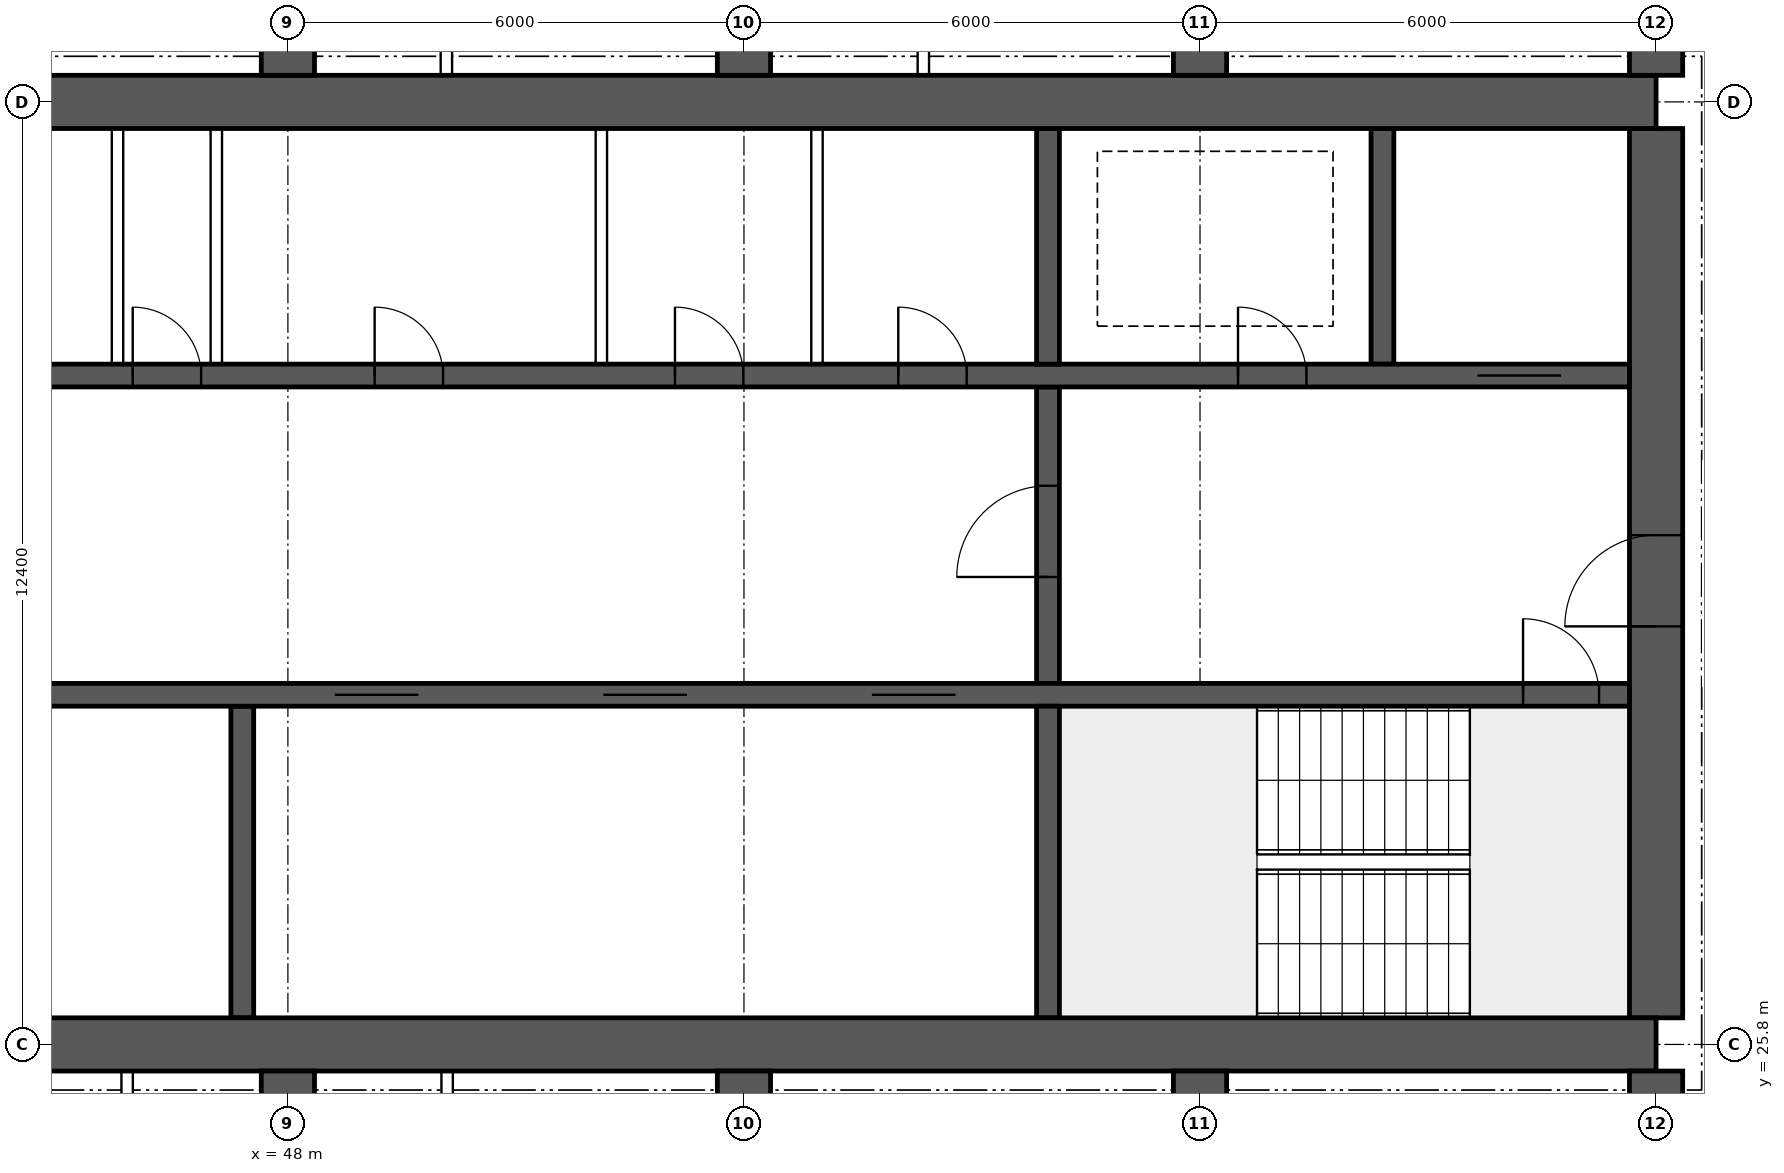
"""IFC4 building model, lengths in metres.
Left out: names, types, materials, properties, quantities, classifications, styles, units other than length and angle.
Written with IfcOpenShell. Run it as: python <this file> out.ifc"""

import sys

from ifc_helpers import new_model, si_unit, direction, frame, frame_2d, origin, place, context, subcontext, project, spatial, rectangle, extrude, element, fill, save


model = new_model("IFC4")
c1 = context("Model", 3, precision=1e-05, world=origin(), true_north=direction((0.0, 1.0)))
c2 = subcontext(c1, "Body", "Model", "MODEL_VIEW")
j1 = project(units=[si_unit("LENGTHUNIT", "METRE"), si_unit("PLANEANGLEUNIT", "RADIAN")], contexts=[c1])
p1 = place(None, origin())
s1 = spatial("IfcSite", under=j1, at=p1, CompositionType="ELEMENT")
p2 = place(p1, origin())
s2 = spatial("IfcBuilding", under=s1, at=p2, CompositionType="ELEMENT")
p3 = place(p2, frame((0.0, 0.0, 239.05)))
s3 = spatial("IfcBuildingStorey", under=s2, at=p3, CompositionType="ELEMENT", Elevation=239.05)
for number, where, z_axis, x_axis in (
    (1, (18.0, 25.8, 0.0), (0.0, 0.0, 1.0), (1.0, 0.0, 0.0)),
    (2, (18.0, 38.2, 0.0), (0.0, 0.0, 1.0), (1.0, 0.0, 0.0)),
):
    element("IfcWall", number, at=place(p3, frame(where, z_axis=z_axis, x_axis=x_axis)), inside=s3, PredefinedType="SHEAR", context=c2, shape_type="SweptSolid", body=[
        extrude(rectangle(XDim=48.0, YDim=0.7, at=frame_2d((24.0, 0.0))), origin(), (0.0, 0.0, 1.0), 3.75),
    ])
p4 = place(p3, frame((66.0, 26.15, 0.0), z_axis=(0.0, 0.0, 1.0), x_axis=(0.0, 1.0, 0.0)))
e3 = element("IfcWall", 3, at=p4, inside=s3, PredefinedType="SHEAR", context=c2, shape_type="SweptSolid", body=[
    extrude(rectangle(XDim=11.7, YDim=0.7, at=frame_2d((5.85, 0.0))), origin(), (0.0, 0.0, 1.0), 3.75),
])
p5 = place(p4, frame((5.15, 0.0, 0.0)))
e4 = element("IfcOpeningElement", 4, at=p5, cuts=e3, PredefinedType="OPENING", context=c2, shape_type="SweptSolid", body=[
    extrude(rectangle(XDim=1.2, YDim=2.1, at=frame_2d((0.6, 1.05))), frame((0.0, 0.36, 0.0), z_axis=(0.0, -1.0, 0.0), x_axis=(1.0, 0.0, 0.0)), (0.0, 0.0, 1.0), 0.72),
])
p6 = place(p3, frame((18.35, 30.4, 0.0), z_axis=(0.0, 0.0, 1.0), x_axis=(1.0, 0.0, 0.0)))
e5 = element("IfcWall", 5, at=p6, inside=s3, PredefinedType="SHEAR", context=c2, shape_type="SweptSolid", body=[
    extrude(rectangle(XDim=47.3, YDim=0.3, at=frame_2d((23.65, 0.0))), origin(), (0.0, 0.0, 1.0), 3.75),
])
p7 = place(p6, frame((0.4, 0.0, 0.0)))
e6 = element("IfcOpeningElement", 6, at=p7, cuts=e5, PredefinedType="OPENING", context=c2, shape_type="SweptSolid", body=[
    extrude(rectangle(XDim=1.0, YDim=2.1, at=frame_2d((0.5, 1.05))), frame((0.0, 0.16, 0.0), z_axis=(0.0, -1.0, 0.0), x_axis=(1.0, 0.0, 0.0)), (0.0, 0.0, 1.0), 0.32),
])
p8 = place(p6, frame((45.9, 0.0, 0.0)))
e7 = element("IfcOpeningElement", 7, at=p8, cuts=e5, PredefinedType="OPENING", context=c2, shape_type="SweptSolid", body=[
    extrude(rectangle(XDim=1.0, YDim=2.1, at=frame_2d((0.5, 1.05))), frame((0.0, 0.16, 0.0), z_axis=(0.0, -1.0, 0.0), x_axis=(1.0, 0.0, 0.0)), (0.0, 0.0, 1.0), 0.32),
])
p9 = place(p6, frame((8.4, 0.0, 0.0)))
e8 = element("IfcOpeningElement", 8, at=p9, cuts=e5, PredefinedType="OPENING", context=c2, shape_type="SweptSolid", body=[
    extrude(rectangle(XDim=1.1, YDim=2.1, at=frame_2d((0.55, 1.05))), frame((0.0, 0.16, 0.0), z_axis=(0.0, -1.0, 0.0), x_axis=(1.0, 0.0, 0.0)), (0.0, 0.0, 1.0), 0.32),
])
p10 = place(p6, frame((11.0, 0.0, 0.0)))
e9 = element("IfcOpeningElement", 9, at=p10, cuts=e5, PredefinedType="OPENING", context=c2, shape_type="SweptSolid", body=[
    extrude(rectangle(XDim=1.1, YDim=2.1, at=frame_2d((0.55, 1.05))), frame((0.0, 0.16, 0.0), z_axis=(0.0, -1.0, 0.0), x_axis=(1.0, 0.0, 0.0)), (0.0, 0.0, 1.0), 0.32),
])
p11 = place(p6, frame((13.6, 0.0, 0.0)))
e10 = element("IfcOpeningElement", 10, at=p11, cuts=e5, PredefinedType="OPENING", context=c2, shape_type="SweptSolid", body=[
    extrude(rectangle(XDim=1.1, YDim=2.1, at=frame_2d((0.55, 1.05))), frame((0.0, 0.16, 0.0), z_axis=(0.0, -1.0, 0.0), x_axis=(1.0, 0.0, 0.0)), (0.0, 0.0, 1.0), 0.32),
])
p12 = place(p6, frame((16.2, 0.0, 0.0)))
e11 = element("IfcOpeningElement", 11, at=p12, cuts=e5, PredefinedType="OPENING", context=c2, shape_type="SweptSolid", body=[
    extrude(rectangle(XDim=1.1, YDim=2.1, at=frame_2d((0.55, 1.05))), frame((0.0, 0.16, 0.0), z_axis=(0.0, -1.0, 0.0), x_axis=(1.0, 0.0, 0.0)), (0.0, 0.0, 1.0), 0.32),
])
p13 = place(p6, frame((18.975, 0.0, 0.0)))
e12 = element("IfcOpeningElement", 12, at=p13, cuts=e5, PredefinedType="OPENING", context=c2, shape_type="SweptSolid", body=[
    extrude(rectangle(XDim=0.9, YDim=2.1, at=frame_2d((0.45, 1.05))), frame((0.0, 0.16, 0.0), z_axis=(0.0, -1.0, 0.0), x_axis=(1.0, 0.0, 0.0)), (0.0, 0.0, 1.0), 0.32),
])
p14 = place(p6, frame((24.475, 0.0, 0.0)))
e13 = element("IfcOpeningElement", 13, at=p14, cuts=e5, PredefinedType="OPENING", context=c2, shape_type="SweptSolid", body=[
    extrude(rectangle(XDim=0.9, YDim=2.1, at=frame_2d((0.45, 1.05))), frame((0.0, 0.16, 0.0), z_axis=(0.0, -1.0, 0.0), x_axis=(1.0, 0.0, 0.0)), (0.0, 0.0, 1.0), 0.32),
])
p15 = place(p6, frame((30.267, 0.0, 0.0)))
e14 = element("IfcOpeningElement", 14, at=p15, cuts=e5, PredefinedType="OPENING", context=c2, shape_type="SweptSolid", body=[
    extrude(rectangle(XDim=1.1, YDim=2.1, at=frame_2d((0.55, 1.05))), frame((0.0, 0.16, 0.0), z_axis=(0.0, -1.0, 0.0), x_axis=(1.0, 0.0, 0.0)), (0.0, 0.0, 1.0), 0.32),
])
p16 = place(p6, frame((33.8, 0.0, 0.0)))
e15 = element("IfcOpeningElement", 15, at=p16, cuts=e5, PredefinedType="OPENING", context=c2, shape_type="SweptSolid", body=[
    extrude(rectangle(XDim=1.1, YDim=2.1, at=frame_2d((0.55, 1.05))), frame((0.0, 0.16, 0.0), z_axis=(0.0, -1.0, 0.0), x_axis=(1.0, 0.0, 0.0)), (0.0, 0.0, 1.0), 0.32),
])
p17 = place(p6, frame((37.333, 0.0, 0.0)))
e16 = element("IfcOpeningElement", 16, at=p17, cuts=e5, PredefinedType="OPENING", context=c2, shape_type="SweptSolid", body=[
    extrude(rectangle(XDim=1.1, YDim=2.1, at=frame_2d((0.55, 1.05))), frame((0.0, 0.16, 0.0), z_axis=(0.0, -1.0, 0.0), x_axis=(1.0, 0.0, 0.0)), (0.0, 0.0, 1.0), 0.32),
])
p18 = place(p3, frame((18.35, 34.6, 0.0), z_axis=(0.0, 0.0, 1.0), x_axis=(1.0, 0.0, 0.0)))
e17 = element("IfcWall", 17, at=p18, inside=s3, PredefinedType="SHEAR", context=c2, shape_type="SweptSolid", body=[
    extrude(rectangle(XDim=47.3, YDim=0.3, at=frame_2d((23.65, 0.0))), origin(), (0.0, 0.0, 1.0), 3.75),
])
p19 = place(p18, frame((0.9, 0.0, 0.0)))
e18 = element("IfcOpeningElement", 18, at=p19, cuts=e17, PredefinedType="OPENING", context=c2, shape_type="SweptSolid", body=[
    extrude(rectangle(XDim=1.1, YDim=2.1, at=frame_2d((0.55, 1.05))), frame((0.0, 0.16, 0.0), z_axis=(0.0, -1.0, 0.0), x_axis=(1.0, 0.0, 0.0)), (0.0, 0.0, 1.0), 0.32),
])
p20 = place(p18, frame((45.3, 0.0, 0.0)))
e19 = element("IfcOpeningElement", 19, at=p20, cuts=e17, PredefinedType="OPENING", context=c2, shape_type="SweptSolid", body=[
    extrude(rectangle(XDim=1.1, YDim=2.1, at=frame_2d((0.55, 1.05))), frame((0.0, 0.16, 0.0), z_axis=(0.0, -1.0, 0.0), x_axis=(1.0, 0.0, 0.0)), (0.0, 0.0, 1.0), 0.32),
])
p21 = place(p18, frame((4.25, 0.0, 0.0)))
e20 = element("IfcOpeningElement", 20, at=p21, cuts=e17, PredefinedType="OPENING", context=c2, shape_type="SweptSolid", body=[
    extrude(rectangle(XDim=0.9, YDim=2.1, at=frame_2d((0.45, 1.05))), frame((0.0, 0.16, 0.0), z_axis=(0.0, -1.0, 0.0), x_axis=(1.0, 0.0, 0.0)), (0.0, 0.0, 1.0), 0.32),
])
p22 = place(p18, frame((42.15, 0.0, 0.0)))
e21 = element("IfcOpeningElement", 21, at=p22, cuts=e17, PredefinedType="OPENING", context=c2, shape_type="SweptSolid", body=[
    extrude(rectangle(XDim=0.9, YDim=2.1, at=frame_2d((0.45, 1.05))), frame((0.0, 0.16, 0.0), z_axis=(0.0, -1.0, 0.0), x_axis=(1.0, 0.0, 0.0)), (0.0, 0.0, 1.0), 0.32),
])
p23 = place(p18, frame((9.025, 0.0, 0.0)))
e22 = element("IfcOpeningElement", 22, at=p23, cuts=e17, PredefinedType="OPENING", context=c2, shape_type="SweptSolid", body=[
    extrude(rectangle(XDim=0.9, YDim=2.1, at=frame_2d((0.45, 1.05))), frame((0.0, 0.16, 0.0), z_axis=(0.0, -1.0, 0.0), x_axis=(1.0, 0.0, 0.0)), (0.0, 0.0, 1.0), 0.32),
])
p24 = place(p18, frame((12.999, 0.0, 0.0)))
e23 = element("IfcOpeningElement", 23, at=p24, cuts=e17, PredefinedType="OPENING", context=c2, shape_type="SweptSolid", body=[
    extrude(rectangle(XDim=0.9, YDim=2.1, at=frame_2d((0.45, 1.05))), frame((0.0, 0.16, 0.0), z_axis=(0.0, -1.0, 0.0), x_axis=(1.0, 0.0, 0.0)), (0.0, 0.0, 1.0), 0.32),
])
p25 = place(p18, frame((16.646, 0.0, 0.0)))
e24 = element("IfcOpeningElement", 24, at=p25, cuts=e17, PredefinedType="OPENING", context=c2, shape_type="SweptSolid", body=[
    extrude(rectangle(XDim=0.9, YDim=2.1, at=frame_2d((0.45, 1.05))), frame((0.0, 0.16, 0.0), z_axis=(0.0, -1.0, 0.0), x_axis=(1.0, 0.0, 0.0)), (0.0, 0.0, 1.0), 0.32),
])
p26 = place(p18, frame((20.405, 0.0, 0.0)))
e25 = element("IfcOpeningElement", 25, at=p26, cuts=e17, PredefinedType="OPENING", context=c2, shape_type="SweptSolid", body=[
    extrude(rectangle(XDim=0.9, YDim=2.1, at=frame_2d((0.45, 1.05))), frame((0.0, 0.16, 0.0), z_axis=(0.0, -1.0, 0.0), x_axis=(1.0, 0.0, 0.0)), (0.0, 0.0, 1.0), 0.32),
])
p27 = place(p18, frame((24.811, 0.0, 0.0)))
e26 = element("IfcOpeningElement", 26, at=p27, cuts=e17, PredefinedType="OPENING", context=c2, shape_type="SweptSolid", body=[
    extrude(rectangle(XDim=0.9, YDim=2.1, at=frame_2d((0.45, 1.05))), frame((0.0, 0.16, 0.0), z_axis=(0.0, -1.0, 0.0), x_axis=(1.0, 0.0, 0.0)), (0.0, 0.0, 1.0), 0.32),
])
p28 = place(p18, frame((27.608, 0.0, 0.0)))
e27 = element("IfcOpeningElement", 27, at=p28, cuts=e17, PredefinedType="OPENING", context=c2, shape_type="SweptSolid", body=[
    extrude(rectangle(XDim=0.9, YDim=2.1, at=frame_2d((0.45, 1.05))), frame((0.0, 0.16, 0.0), z_axis=(0.0, -1.0, 0.0), x_axis=(1.0, 0.0, 0.0)), (0.0, 0.0, 1.0), 0.32),
])
p29 = place(p18, frame((30.791, 0.0, 0.0)))
e28 = element("IfcOpeningElement", 28, at=p29, cuts=e17, PredefinedType="OPENING", context=c2, shape_type="SweptSolid", body=[
    extrude(rectangle(XDim=0.9, YDim=2.1, at=frame_2d((0.45, 1.05))), frame((0.0, 0.16, 0.0), z_axis=(0.0, -1.0, 0.0), x_axis=(1.0, 0.0, 0.0)), (0.0, 0.0, 1.0), 0.32),
])
p30 = place(p18, frame((34.742, 0.0, 0.0)))
e29 = element("IfcOpeningElement", 29, at=p30, cuts=e17, PredefinedType="OPENING", context=c2, shape_type="SweptSolid", body=[
    extrude(rectangle(XDim=0.9, YDim=2.1, at=frame_2d((0.45, 1.05))), frame((0.0, 0.16, 0.0), z_axis=(0.0, -1.0, 0.0), x_axis=(1.0, 0.0, 0.0)), (0.0, 0.0, 1.0), 0.32),
])
p31 = place(p18, frame((37.68, 0.0, 0.0)))
e30 = element("IfcOpeningElement", 30, at=p31, cuts=e17, PredefinedType="OPENING", context=c2, shape_type="SweptSolid", body=[
    extrude(rectangle(XDim=0.9, YDim=2.1, at=frame_2d((0.45, 1.05))), frame((0.0, 0.16, 0.0), z_axis=(0.0, -1.0, 0.0), x_axis=(1.0, 0.0, 0.0)), (0.0, 0.0, 1.0), 0.32),
])
p32 = place(p3, frame((58.0, 26.15, 0.0), z_axis=(0.0, 0.0, 1.0), x_axis=(0.0, 1.0, 0.0)))
e31 = element("IfcWall", 31, at=p32, inside=s3, PredefinedType="SHEAR", context=c2, shape_type="SweptSolid", body=[
    extrude(rectangle(XDim=4.1, YDim=0.3, at=frame_2d((2.05, 0.0))), origin(), (0.0, 0.0, 1.0), 3.75),
])
p33 = place(p3, frame((58.0, 30.55, 0.0), z_axis=(0.0, 0.0, 1.0), x_axis=(0.0, 1.0, 0.0)))
e32 = element("IfcWall", 32, at=p33, inside=s3, PredefinedType="SHEAR", context=c2, shape_type="SweptSolid", body=[
    extrude(rectangle(XDim=3.9, YDim=0.3, at=frame_2d((1.95, 0.0))), origin(), (0.0, 0.0, 1.0), 3.75),
])
p34 = place(p33, frame((1.4, 0.0, 0.0)))
e33 = element("IfcOpeningElement", 33, at=p34, cuts=e32, PredefinedType="OPENING", context=c2, shape_type="SweptSolid", body=[
    extrude(rectangle(XDim=1.2, YDim=2.1, at=frame_2d((0.6, 1.05))), frame((0.0, 0.16, 0.0), z_axis=(0.0, -1.0, 0.0), x_axis=(1.0, 0.0, 0.0)), (0.0, 0.0, 1.0), 0.32),
])
for number, where, z_axis, x_axis in (
    (34, (62.4, 34.75, 0.0), (0.0, 0.0, 1.0), (0.0, 1.0, 0.0)),
    (35, (58.0, 34.75, 0.0), (0.0, 0.0, 1.0), (0.0, 1.0, 0.0)),
):
    element("IfcWall", number, at=place(p3, frame(where, z_axis=z_axis, x_axis=x_axis)), inside=s3, PredefinedType="SHEAR", context=c2, shape_type="SweptSolid", body=[
        extrude(rectangle(XDim=3.1, YDim=0.3, at=frame_2d((1.55, 0.0))), origin(), (0.0, 0.0, 1.0), 3.75),
    ])
p35 = place(p3, frame((47.4, 26.15, 0.0), z_axis=(0.0, 0.0, 1.0), x_axis=(0.0, 1.0, 0.0)))
e36 = element("IfcWall", 36, at=p35, inside=s3, PredefinedType="SHEAR", context=c2, shape_type="SweptSolid", body=[
    extrude(rectangle(XDim=4.1, YDim=0.3, at=frame_2d((2.05, 0.0))), origin(), (0.0, 0.0, 1.0), 3.75),
])
for number, where, z_axis, x_axis in (
    (37, (48.0, 18.4, 0.0), (0.0, 0.0, 1.0), (0.0, 1.0, 0.0)),
    (38, (48.0, 38.55, 0.0), (0.0, 0.0, 1.0), (0.0, 1.0, 0.0)),
    (39, (54.0, 18.4, 0.0), (0.0, 0.0, 1.0), (0.0, 1.0, 0.0)),
    (40, (54.0, 38.55, 0.0), (0.0, 0.0, 1.0), (0.0, 1.0, 0.0)),
    (41, (60.0, 18.4, 0.0), (0.0, 0.0, 1.0), (0.0, 1.0, 0.0)),
    (42, (60.0, 38.55, 0.0), (0.0, 0.0, 1.0), (0.0, 1.0, 0.0)),
    (43, (66.0, 18.4, 0.0), (0.0, 0.0, 1.0), (0.0, 1.0, 0.0)),
    (44, (66.0, 38.55, 0.0), (0.0, 0.0, 1.0), (0.0, 1.0, 0.0)),
):
    element("IfcWall", number, at=place(p3, frame(where, z_axis=z_axis, x_axis=x_axis)), inside=s3, PredefinedType="SHEAR", context=c2, shape_type="SweptSolid", body=[
        extrude(rectangle(XDim=7.05, YDim=0.7, at=frame_2d((3.525, 0.0))), origin(), (0.0, 0.0, 1.0), 3.75),
    ])
for number, where, z_axis, x_axis in (
    (45, (45.758, 34.75, 0.0), (0.0, 0.0, 1.0), (0.0, 1.0, 0.0)),
    (46, (47.058, 34.75, 0.0), (0.0, 0.0, 1.0), (0.0, 1.0, 0.0)),
    (47, (52.124, 34.75, 0.0), (0.0, 0.0, 1.0), (0.0, 1.0, 0.0)),
    (48, (54.961, 34.75, 0.0), (0.0, 0.0, 1.0), (0.0, 1.0, 0.0)),
):
    element("IfcWall", number, at=place(p3, frame(where, z_axis=z_axis, x_axis=x_axis)), inside=s3, PredefinedType="SOLIDWALL", context=c2, shape_type="SweptSolid", body=[
        extrude(rectangle(XDim=3.1, YDim=0.15, at=frame_2d((1.55, 0.0))), origin(), (0.0, 0.0, 1.0), 3.5),
    ])
for number, where, z_axis, x_axis in (
    (49, (45.885, 18.5, 0.0), (0.0, 0.0, 1.0), (0.0, 1.0, 0.0)),
    (50, (50.095, 18.5, 0.0), (0.0, 0.0, 1.0), (0.0, 1.0, 0.0)),
    (51, (50.085, 38.55, 0.0), (0.0, 0.0, 1.0), (0.0, 1.0, 0.0)),
    (52, (56.36, 38.55, 0.0), (0.0, 0.0, 1.0), (0.0, 1.0, 0.0)),
):
    element("IfcWall", number, at=place(p3, frame(where, z_axis=z_axis, x_axis=x_axis)), inside=s3, PredefinedType="PARTITIONING", context=c2, shape_type="SweptSolid", body=[
        extrude(rectangle(XDim=6.95, YDim=0.15, at=frame_2d((3.475, 0.0))), origin(), (0.0, 0.0, 1.0), 3.5),
    ])
p36 = place(p5, origin())
e53 = element("IfcDoor", 53, at=p36, inside=s3, OperationType="SINGLE_SWING_LEFT", PredefinedType="DOOR", context=c2, shape_type="SweptSolid", body=[
    extrude(rectangle(XDim=1.2, YDim=2.1, at=frame_2d((0.6, 1.05))), frame((0.0, 0.025, 0.0), z_axis=(0.0, -1.0, 0.0), x_axis=(1.0, 0.0, 0.0)), (0.0, 0.0, 1.0), 0.05),
])
fill(e4, e53)
p37 = place(p8, origin())
e54 = element("IfcDoor", 54, at=p37, inside=s3, OperationType="SINGLE_SWING_LEFT", PredefinedType="DOOR", context=c2, shape_type="SweptSolid", body=[
    extrude(rectangle(XDim=1.0, YDim=2.1, at=frame_2d((0.5, 1.05))), frame((0.0, 0.025, 0.0), z_axis=(0.0, -1.0, 0.0), x_axis=(1.0, 0.0, 0.0)), (0.0, 0.0, 1.0), 0.05),
])
fill(e7, e54)
p38 = place(p20, origin())
e55 = element("IfcDoor", 55, at=p38, inside=s3, OperationType="DOUBLE_DOOR_SLIDING", PredefinedType="DOOR", context=c2, shape_type="SweptSolid", body=[
    extrude(rectangle(XDim=1.1, YDim=2.1, at=frame_2d((0.55, 1.05))), frame((0.0, 0.025, 0.0), z_axis=(0.0, -1.0, 0.0), x_axis=(1.0, 0.0, 0.0)), (0.0, 0.0, 1.0), 0.05),
])
fill(e19, e55)
p39 = place(p22, origin())
e56 = element("IfcDoor", 56, at=p39, inside=s3, OperationType="SINGLE_SWING_LEFT", PredefinedType="DOOR", context=c2, shape_type="SweptSolid", body=[
    extrude(rectangle(XDim=0.9, YDim=2.1, at=frame_2d((0.45, 1.05))), frame((0.0, 0.025, 0.0), z_axis=(0.0, -1.0, 0.0), x_axis=(1.0, 0.0, 0.0)), (0.0, 0.0, 1.0), 0.05),
])
fill(e21, e56)
p40 = place(p34, origin())
e57 = element("IfcDoor", 57, at=p40, inside=s3, OperationType="SINGLE_SWING_LEFT", PredefinedType="DOOR", context=c2, shape_type="SweptSolid", body=[
    extrude(rectangle(XDim=1.2, YDim=2.1, at=frame_2d((0.6, 1.05))), frame((0.0, 0.025, 0.0), z_axis=(0.0, -1.0, 0.0), x_axis=(1.0, 0.0, 0.0)), (0.0, 0.0, 1.0), 0.05),
])
fill(e33, e57)
p41 = place(p28, origin())
e58 = element("IfcDoor", 58, at=p41, inside=s3, OperationType="SINGLE_SWING_LEFT", PredefinedType="DOOR", context=c2, shape_type="SweptSolid", body=[
    extrude(rectangle(XDim=0.9, YDim=2.1, at=frame_2d((0.45, 1.05))), frame((0.0, 0.025, 0.0), z_axis=(0.0, -1.0, 0.0), x_axis=(1.0, 0.0, 0.0)), (0.0, 0.0, 1.0), 0.05),
])
fill(e27, e58)
p42 = place(p29, origin())
e59 = element("IfcDoor", 59, at=p42, inside=s3, OperationType="SINGLE_SWING_LEFT", PredefinedType="DOOR", context=c2, shape_type="SweptSolid", body=[
    extrude(rectangle(XDim=0.9, YDim=2.1, at=frame_2d((0.45, 1.05))), frame((0.0, 0.025, 0.0), z_axis=(0.0, -1.0, 0.0), x_axis=(1.0, 0.0, 0.0)), (0.0, 0.0, 1.0), 0.05),
])
fill(e28, e59)
p43 = place(p30, origin())
e60 = element("IfcDoor", 60, at=p43, inside=s3, OperationType="SINGLE_SWING_LEFT", PredefinedType="DOOR", context=c2, shape_type="SweptSolid", body=[
    extrude(rectangle(XDim=0.9, YDim=2.1, at=frame_2d((0.45, 1.05))), frame((0.0, 0.025, 0.0), z_axis=(0.0, -1.0, 0.0), x_axis=(1.0, 0.0, 0.0)), (0.0, 0.0, 1.0), 0.05),
])
fill(e29, e60)
p44 = place(p31, origin())
e61 = element("IfcDoor", 61, at=p44, inside=s3, OperationType="SINGLE_SWING_LEFT", PredefinedType="DOOR", context=c2, shape_type="SweptSolid", body=[
    extrude(rectangle(XDim=0.9, YDim=2.1, at=frame_2d((0.45, 1.05))), frame((0.0, 0.025, 0.0), z_axis=(0.0, -1.0, 0.0), x_axis=(1.0, 0.0, 0.0)), (0.0, 0.0, 1.0), 0.05),
])
fill(e30, e61)
p45 = place(p15, origin())
e62 = element("IfcDoor", 62, at=p45, inside=s3, OperationType="DOUBLE_DOOR_SLIDING", PredefinedType="DOOR", context=c2, shape_type="SweptSolid", body=[
    extrude(rectangle(XDim=1.1, YDim=2.1, at=frame_2d((0.55, 1.05))), frame((0.0, 0.025, 0.0), z_axis=(0.0, -1.0, 0.0), x_axis=(1.0, 0.0, 0.0)), (0.0, 0.0, 1.0), 0.05),
])
fill(e14, e62)
p46 = place(p16, origin())
e63 = element("IfcDoor", 63, at=p46, inside=s3, OperationType="DOUBLE_DOOR_SLIDING", PredefinedType="DOOR", context=c2, shape_type="SweptSolid", body=[
    extrude(rectangle(XDim=1.1, YDim=2.1, at=frame_2d((0.55, 1.05))), frame((0.0, 0.025, 0.0), z_axis=(0.0, -1.0, 0.0), x_axis=(1.0, 0.0, 0.0)), (0.0, 0.0, 1.0), 0.05),
])
fill(e15, e63)
p47 = place(p17, origin())
e64 = element("IfcDoor", 64, at=p47, inside=s3, OperationType="DOUBLE_DOOR_SLIDING", PredefinedType="DOOR", context=c2, shape_type="SweptSolid", body=[
    extrude(rectangle(XDim=1.1, YDim=2.1, at=frame_2d((0.55, 1.05))), frame((0.0, 0.025, 0.0), z_axis=(0.0, -1.0, 0.0), x_axis=(1.0, 0.0, 0.0)), (0.0, 0.0, 1.0), 0.05),
])
fill(e16, e64)
save(model, sys.argv[1])
